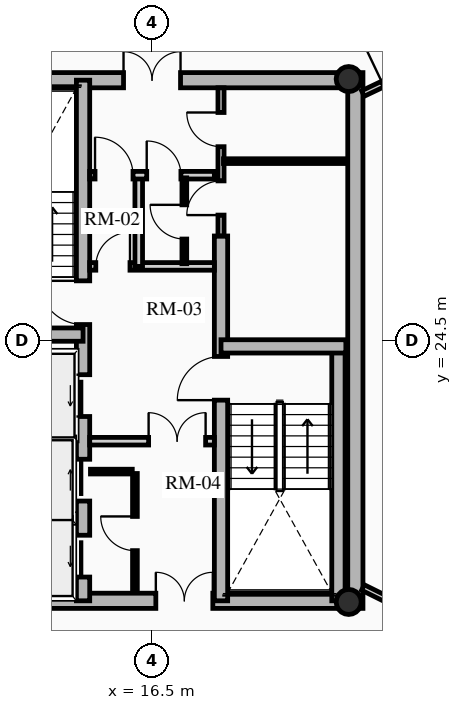
"""IFC4 building model, lengths in metres.
Left out: names, types, materials, properties, quantities, classifications, styles, units other than length and angle.
Written with IfcOpenShell. Run it as: python <this file> out.ifc"""

import sys

from ifc_helpers import new_model, si_unit, direction, frame, frame_2d, origin, origin_2d, place, context, subcontext, project, spatial, rectangle, hollow_circle, extrude, source, transform, mapped, element, fill, save


model = new_model("IFC4")
c1 = context("Model", 3, precision=1e-05, world=origin(), true_north=direction((0.0, 1.0)))
c2 = subcontext(c1, "Body", "Model", "MODEL_VIEW")
j1 = project(units=[si_unit("LENGTHUNIT", "METRE"), si_unit("PLANEANGLEUNIT", "RADIAN")], contexts=[c1])
p1 = place(None, origin())
s1 = spatial("IfcSite", under=j1, at=p1, CompositionType="ELEMENT")
p2 = place(p1, origin())
s2 = spatial("IfcBuilding", under=s1, at=p2, CompositionType="ELEMENT")
p3 = place(p2, frame((0.0, 0.0, 219.94)))
s3 = spatial("IfcBuildingStorey", under=s2, at=p3, CompositionType="ELEMENT", Elevation=219.94)
p4 = place(p3, frame((21.85, 17.45, 0.0), z_axis=(0.0, 0.0, 1.0), x_axis=(0.0, 1.0, 0.0)))
e1 = element("IfcWall", 1, at=p4, inside=s3, PredefinedType="SHEAR", context=c2, shape_type="SweptSolid", body=[
    extrude(rectangle(XDim=14.1, YDim=0.4, at=frame_2d((7.05, 0.0))), origin(), (0.0, 0.0, 1.0), 2.91),
])
p5 = place(p3, frame((11.15, 17.65, 0.0), z_axis=(0.0, 0.0, 1.0), x_axis=(1.0, 0.0, 0.0)))
e2 = element("IfcWall", 2, at=p5, inside=s3, PredefinedType="SHEAR", context=c2, shape_type="SweptSolid", body=[
    extrude(rectangle(XDim=10.7, YDim=0.4, at=frame_2d((5.35, 0.0))), origin(), (0.0, 0.0, 1.0), 2.91),
])
m1 = source(origin(), c2, "Body", "SweptSolid", [
    extrude(rectangle(XDim=1.5, YDim=2.02, at=frame_2d((0.75, 1.01))), frame((0.0, 0.21, 0.0), z_axis=(0.0, -1.0, 0.0), x_axis=(1.0, 0.0, 0.0)), (0.0, 0.0, 1.0), 0.42),
])
p6 = place(p5, frame((5.45, 0.0, 0.0)))
e3 = element("IfcOpeningElement", 3, at=p6, cuts=e2, PredefinedType="OPENING", context=c2, shape_type="MappedRepresentation", body=[
    mapped(m1, transform((0.0, 0.0, 0.0), x_axis=(1.0, 0.0, 0.0), y_axis=(0.0, 1.0, 0.0), z_axis=(0.0, 0.0, 1.0), scale=1.0)),
])
p7 = place(p3, frame((11.15, 31.35, 0.0), z_axis=(0.0, 0.0, 1.0), x_axis=(1.0, 0.0, 0.0)))
e4 = element("IfcWall", 4, at=p7, inside=s3, PredefinedType="SHEAR", context=c2, shape_type="SweptSolid", body=[
    extrude(rectangle(XDim=10.7, YDim=0.4, at=frame_2d((5.35, 0.0))), origin(), (0.0, 0.0, 1.0), 2.91),
])
p8 = place(p7, frame((4.6, 0.0, 0.0)))
e5 = element("IfcOpeningElement", 5, at=p8, cuts=e4, PredefinedType="OPENING", context=c2, shape_type="MappedRepresentation", body=[
    mapped(m1, transform((0.0, 0.0, 0.0), x_axis=(1.0, 0.0, 0.0), y_axis=(0.0, 1.0, 0.0), z_axis=(0.0, 0.0, 1.0), scale=1.0)),
])
p9 = place(p3, frame((14.685, 17.65, 0.0), z_axis=(0.0, 0.0, 1.0), x_axis=(0.0, 1.0, 0.0)))
e6 = element("IfcWall", 6, at=p9, inside=s3, PredefinedType="SHEAR", context=c2, shape_type="SweptSolid", body=[
    extrude(rectangle(XDim=13.7, YDim=0.35, at=frame_2d((6.85, 0.0))), origin(), (0.0, 0.0, 1.0), 2.91),
])
m2 = source(origin(), c2, "Body", "SweptSolid", [
    extrude(rectangle(XDim=1.1, YDim=2.015, at=frame_2d((0.55, 1.007))), frame((0.0, 0.185, 0.0), z_axis=(0.0, -1.0, 0.0), x_axis=(1.0, 0.0, 0.0)), (0.0, 0.0, 1.0), 0.37),
])
p10 = place(p9, frame((4.85, 0.0, 0.0)))
e7 = element("IfcOpeningElement", 7, at=p10, cuts=e6, PredefinedType="OPENING", context=c2, shape_type="MappedRepresentation", body=[
    mapped(m2, transform((0.0, 0.0, 0.0), x_axis=(1.0, 0.0, 0.0), y_axis=(0.0, 1.0, 0.0), z_axis=(0.0, 0.0, 1.0), scale=1.0)),
])
p11 = place(p9, frame((0.625, 0.0, 0.0)))
e8 = element("IfcOpeningElement", 8, at=p11, cuts=e6, PredefinedType="OPENING", context=c2, shape_type="MappedRepresentation", body=[
    mapped(m2, transform((0.0, 0.0, 0.0), x_axis=(1.0, 0.0, 0.0), y_axis=(0.0, 1.0, 0.0), z_axis=(0.0, 0.0, 1.0), scale=1.0)),
])
p12 = place(p9, frame((2.625, 0.0, 0.0)))
e9 = element("IfcOpeningElement", 9, at=p12, cuts=e6, PredefinedType="OPENING", context=c2, shape_type="MappedRepresentation", body=[
    mapped(m2, transform((0.0, 0.0, 0.0), x_axis=(1.0, 0.0, 0.0), y_axis=(0.0, 1.0, 0.0), z_axis=(0.0, 0.0, 1.0), scale=1.0)),
])
m3 = source(origin(), c2, "Body", "SweptSolid", [
    extrude(rectangle(XDim=1.15, YDim=2.02, at=frame_2d((0.575, 1.01))), frame((0.0, 0.185, 0.0), z_axis=(0.0, -1.0, 0.0), x_axis=(1.0, 0.0, 0.0)), (0.0, 0.0, 1.0), 0.37),
])
p13 = place(p9, frame((7.27, 0.0, 0.0)))
e10 = element("IfcOpeningElement", 10, at=p13, cuts=e6, PredefinedType="OPENING", context=c2, shape_type="MappedRepresentation", body=[
    mapped(m3, transform((0.0, 0.0, 0.0), x_axis=(1.0, 0.0, 0.0), y_axis=(0.0, 1.0, 0.0), z_axis=(0.0, 0.0, 1.0), scale=1.0)),
])
p14 = place(p3, frame((18.315, 17.65, 0.0), z_axis=(0.0, 0.0, 1.0), x_axis=(0.0, 1.0, 0.0)))
e11 = element("IfcWall", 11, at=p14, inside=s3, PredefinedType="SHEAR", context=c2, shape_type="SweptSolid", body=[
    extrude(rectangle(XDim=9.6, YDim=0.35, at=frame_2d((4.8, 0.0))), origin(), (0.0, 0.0, 1.0), 2.91),
])
p15 = place(p14, frame((5.28, 0.0, 0.0)))
e12 = element("IfcOpeningElement", 12, at=p15, cuts=e11, PredefinedType="OPENING", context=c2, shape_type="MappedRepresentation", body=[
    mapped(m3, transform((0.0, 0.0, 0.0), x_axis=(1.0, 0.0, 0.0), y_axis=(0.0, 1.0, 0.0), z_axis=(0.0, 0.0, 1.0), scale=1.0)),
])
p16 = place(p3, frame((11.4, 24.655, 0.0), z_axis=(0.0, 0.0, 1.0), x_axis=(1.0, 0.0, 0.0)))
e13 = element("IfcWall", 13, at=p16, inside=s3, PredefinedType="SHEAR", context=c2, shape_type="SweptSolid", body=[
    extrude(rectangle(XDim=3.285, YDim=0.35, at=frame_2d((1.643, 0.0))), origin(), (0.0, 0.0, 1.0), 2.91),
])
p17 = place(p3, frame((21.405, 17.65, 0.0), z_axis=(0.0, 0.0, 1.0), x_axis=(0.0, 1.0, 0.0)))
e14 = element("IfcWall", 14, at=p17, inside=s3, PredefinedType="SHEAR", context=c2, shape_type="SweptSolid", body=[
    extrude(rectangle(XDim=6.695, YDim=0.35, at=frame_2d((3.348, 0.0))), origin(), (0.0, 0.0, 1.0), 2.91),
])
p18 = place(p3, frame((18.315, 24.345, 0.0), z_axis=(0.0, 0.0, 1.0), x_axis=(1.0, 0.0, 0.0)))
e15 = element("IfcWall", 15, at=p18, inside=s3, PredefinedType="SHEAR", context=c2, shape_type="SweptSolid", body=[
    extrude(rectangle(XDim=3.285, YDim=0.35, at=frame_2d((1.643, 0.0))), origin(), (0.0, 0.0, 1.0), 2.91),
])
for number, where, z_axis, x_axis in (
    (16, (21.675, 17.62, 0.0), (0.0, 0.0, 1.0), (1.0, 0.0, 0.0)),
    (17, (21.675, 31.38, 0.0), (0.0, 0.0, 1.0), (1.0, 0.0, 0.0)),
):
    element("IfcColumn", number, at=place(p3, frame(where, z_axis=z_axis, x_axis=x_axis)), inside=s3, PredefinedType="COLUMN", context=c2, shape_type="SweptSolid", body=[
        extrude(hollow_circle(Radius=0.33, WallThickness=0.025, at=origin_2d()), origin(), (0.0, 0.0, 1.0), 2.91),
    ])
for number, where, z_axis, x_axis in (
    (18, (11.52, 21.8, 0.0), (0.0, 0.0, 1.0), (1.0, 0.0, 0.0)),
    (19, (11.52, 19.825, 0.0), (0.0, 0.0, 1.0), (1.0, 0.0, 0.0)),
):
    element("IfcWall", number, at=place(p3, frame(where, z_axis=z_axis, x_axis=x_axis)), inside=s3, PredefinedType="SHEAR", context=c2, shape_type="SweptSolid", body=[
        extrude(rectangle(XDim=2.97, YDim=0.2, at=frame_2d((1.485, 0.0))), origin(), (0.0, 0.0, 1.0), 2.91),
    ])
p19 = place(p3, frame((14.86, 21.85, 0.0), z_axis=(0.0, 0.0, 1.0), x_axis=(1.0, 0.0, 0.0)))
e20 = element("IfcWall", 20, at=p19, inside=s3, PredefinedType="PARTITIONING", context=c2, shape_type="SweptSolid", body=[
    extrude(rectangle(XDim=3.28, YDim=0.2, at=frame_2d((1.64, 0.0))), origin(), (0.0, 0.0, 1.0), 2.685),
])
m4 = source(origin(), c2, "Body", "SweptSolid", [
    extrude(rectangle(XDim=1.5, YDim=2.02, at=frame_2d((0.75, 1.01))), frame((0.0, 0.11, 0.0), z_axis=(0.0, -1.0, 0.0), x_axis=(1.0, 0.0, 0.0)), (0.0, 0.0, 1.0), 0.22),
])
p20 = place(p19, frame((1.55, 0.0, 0.0)))
e21 = element("IfcOpeningElement", 21, at=p20, cuts=e20, PredefinedType="OPENING", context=c2, shape_type="MappedRepresentation", body=[
    mapped(m4, transform((0.0, 0.0, 0.0), x_axis=(1.0, 0.0, 0.0), y_axis=(0.0, 1.0, 0.0), z_axis=(0.0, 0.0, 1.0), scale=1.0)),
])
p21 = place(p3, frame((14.86, 26.45, 0.0), z_axis=(0.0, 0.0, 1.0), x_axis=(1.0, 0.0, 0.0)))
e22 = element("IfcWall", 22, at=p21, inside=s3, PredefinedType="PARTITIONING", context=c2, shape_type="SweptSolid", body=[
    extrude(rectangle(XDim=3.28, YDim=0.2, at=frame_2d((1.64, 0.0))), origin(), (0.0, 0.0, 1.0), 2.685),
])
m5 = source(origin(), c2, "Body", "SweptSolid", [
    extrude(rectangle(XDim=0.9, YDim=2.005, at=frame_2d((0.45, 1.002))), frame((0.0, 0.11, 0.0), z_axis=(0.0, -1.0, 0.0), x_axis=(1.0, 0.0, 0.0)), (0.0, 0.0, 1.0), 0.22),
])
p22 = place(p21, frame((0.16, 0.0, 0.0)))
e23 = element("IfcOpeningElement", 23, at=p22, cuts=e22, PredefinedType="OPENING", context=c2, shape_type="MappedRepresentation", body=[
    mapped(m5, transform((0.0, 0.0, 0.0), x_axis=(1.0, 0.0, 0.0), y_axis=(0.0, 1.0, 0.0), z_axis=(0.0, 0.0, 1.0), scale=1.0)),
])
p23 = place(p3, frame((16.15, 26.45, 0.0), z_axis=(0.0, 0.0, 1.0), x_axis=(0.0, 1.0, 0.0)))
e24 = element("IfcWall", 24, at=p23, inside=s3, PredefinedType="PARTITIONING", context=c2, shape_type="SweptSolid", body=[
    extrude(rectangle(XDim=2.4, YDim=0.2, at=frame_2d((1.2, 0.0))), origin(), (0.0, 0.0, 1.0), 2.685),
])
p24 = place(p3, frame((14.86, 28.85, 0.0), z_axis=(0.0, 0.0, 1.0), x_axis=(1.0, 0.0, 0.0)))
e25 = element("IfcWall", 25, at=p24, inside=s3, PredefinedType="PARTITIONING", context=c2, shape_type="SweptSolid", body=[
    extrude(rectangle(XDim=3.28, YDim=0.2, at=frame_2d((1.64, 0.0))), origin(), (0.0, 0.0, 1.0), 2.685),
])
m6 = source(origin(), c2, "Body", "SweptSolid", [
    extrude(rectangle(XDim=1.0, YDim=2.015, at=frame_2d((0.5, 1.007))), frame((0.0, 0.11, 0.0), z_axis=(0.0, -1.0, 0.0), x_axis=(1.0, 0.0, 0.0)), (0.0, 0.0, 1.0), 0.22),
])
p25 = place(p24, frame((0.14, 0.0, 0.0)))
e26 = element("IfcOpeningElement", 26, at=p25, cuts=e25, PredefinedType="OPENING", context=c2, shape_type="MappedRepresentation", body=[
    mapped(m6, transform((0.0, 0.0, 0.0), x_axis=(1.0, 0.0, 0.0), y_axis=(0.0, 1.0, 0.0), z_axis=(0.0, 0.0, 1.0), scale=1.0)),
])
p26 = place(p24, frame((1.5, 0.0, 0.0)))
e27 = element("IfcOpeningElement", 27, at=p26, cuts=e25, PredefinedType="OPENING", context=c2, shape_type="MappedRepresentation", body=[
    mapped(m5, transform((0.0, 0.0, 0.0), x_axis=(1.0, 0.0, 0.0), y_axis=(0.0, 1.0, 0.0), z_axis=(0.0, 0.0, 1.0), scale=1.0)),
])
p27 = place(p3, frame((16.05, 17.92, 0.0), z_axis=(0.0, 0.0, 1.0), x_axis=(0.0, 1.0, 0.0)))
e28 = element("IfcWall", 28, at=p27, inside=s3, PredefinedType="PARTITIONING", context=c2, shape_type="SweptSolid", body=[
    extrude(rectangle(XDim=3.08, YDim=0.125, at=frame_2d((1.54, 0.0))), origin(), (0.0, 0.0, 1.0), 2.685),
])
m7 = source(origin(), c2, "Body", "SweptSolid", [
    extrude(rectangle(XDim=0.9, YDim=2.005, at=frame_2d((0.45, 1.002))), frame((0.0, 0.073, 0.0), z_axis=(0.0, -1.0, 0.0), x_axis=(1.0, 0.0, 0.0)), (0.0, 0.0, 1.0), 0.145),
])
p28 = place(p27, frame((1.05, 0.0, 0.0)))
e29 = element("IfcOpeningElement", 29, at=p28, cuts=e28, PredefinedType="OPENING", context=c2, shape_type="MappedRepresentation", body=[
    mapped(m7, transform((0.0, 0.0, 0.0), x_axis=(1.0, 0.0, 0.0), y_axis=(0.0, 1.0, 0.0), z_axis=(0.0, 0.0, 1.0), scale=1.0)),
])
p29 = place(p3, frame((14.88, 21.05, 0.0), z_axis=(0.0, 0.0, 1.0), x_axis=(1.0, 0.0, 0.0)))
e30 = element("IfcWall", 30, at=p29, inside=s3, PredefinedType="PARTITIONING", context=c2, shape_type="SweptSolid", body=[
    extrude(rectangle(XDim=1.1, YDim=0.125, at=frame_2d((0.55, 0.0))), origin(), (0.0, 0.0, 1.0), 2.685),
])
p30 = place(p3, frame((17.35, 26.52, 0.0), z_axis=(0.0, 0.0, 1.0), x_axis=(0.0, 1.0, 0.0)))
e31 = element("IfcWall", 31, at=p30, inside=s3, PredefinedType="PARTITIONING", context=c2, shape_type="SweptSolid", body=[
    extrude(rectangle(XDim=2.26, YDim=0.125, at=frame_2d((1.13, 0.0))), origin(), (0.0, 0.0, 1.0), 2.685),
])
p31 = place(p30, frame((0.65, 0.0, 0.0)))
e32 = element("IfcOpeningElement", 32, at=p31, cuts=e31, PredefinedType="OPENING", context=c2, shape_type="MappedRepresentation", body=[
    mapped(m7, transform((0.0, 0.0, 0.0), x_axis=(1.0, 0.0, 0.0), y_axis=(0.0, 1.0, 0.0), z_axis=(0.0, 0.0, 1.0), scale=1.0)),
])
p32 = place(p3, frame((18.315, 27.25, 0.0), z_axis=(0.0, 0.0, 1.0), x_axis=(0.0, 1.0, 0.0)))
e33 = element("IfcWall", 33, at=p32, inside=s3, PredefinedType="PARTITIONING", context=c2, shape_type="SweptSolid", body=[
    extrude(rectangle(XDim=3.9, YDim=0.16, at=frame_2d((1.95, 0.0))), origin(), (0.0, 0.0, 1.0), 2.685),
])
m8 = source(origin(), c2, "Body", "SweptSolid", [
    extrude(rectangle(XDim=0.9, YDim=2.005, at=frame_2d((0.45, 1.002))), frame((0.0, 0.09, 0.0), z_axis=(0.0, -1.0, 0.0), x_axis=(1.0, 0.0, 0.0)), (0.0, 0.0, 1.0), 0.18),
])
p33 = place(p32, frame((0.55, 0.0, 0.0)))
e34 = element("IfcOpeningElement", 34, at=p33, cuts=e33, PredefinedType="OPENING", context=c2, shape_type="MappedRepresentation", body=[
    mapped(m8, transform((0.0, 0.0, 0.0), x_axis=(1.0, 0.0, 0.0), y_axis=(0.0, 1.0, 0.0), z_axis=(0.0, 0.0, 1.0), scale=1.0)),
])
p34 = place(p32, frame((2.35, 0.0, 0.0)))
e35 = element("IfcOpeningElement", 35, at=p34, cuts=e33, PredefinedType="OPENING", context=c2, shape_type="MappedRepresentation", body=[
    mapped(m8, transform((0.0, 0.0, 0.0), x_axis=(1.0, 0.0, 0.0), y_axis=(0.0, 1.0, 0.0), z_axis=(0.0, 0.0, 1.0), scale=1.0)),
])
p35 = place(p3, frame((18.38, 29.22, 0.0), z_axis=(0.0, 0.0, 1.0), x_axis=(1.0, 0.0, 0.0)))
e36 = element("IfcWall", 36, at=p35, inside=s3, PredefinedType="PARTITIONING", context=c2, shape_type="SweptSolid", body=[
    extrude(rectangle(XDim=3.22, YDim=0.125, at=frame_2d((1.61, 0.0))), origin(), (0.0, 0.0, 1.0), 2.222),
])
p36 = place(p3, frame((22.05, 31.0, 0.0), z_axis=(0.0, 0.0, 1.0), x_axis=(0.903013459407, 0.429612257891, 0.0)))
e37 = element("IfcWall", 37, at=p36, inside=s3, PredefinedType="PARTITIONING", context=c2, shape_type="SweptSolid", body=[
    extrude(rectangle(XDim=1.829, YDim=0.16, at=frame_2d((0.914, 0.0))), origin(), (0.0, 0.0, 1.0), 2.255),
])
m9 = source(origin(), c2, "Body", "SweptSolid", [
    extrude(rectangle(XDim=1.05, YDim=2.015, at=frame_2d((0.525, 1.007))), frame((0.0, 0.09, 0.0), z_axis=(0.0, -1.0, 0.0), x_axis=(1.0, 0.0, 0.0)), (0.0, 0.0, 1.0), 0.18),
])
p37 = place(p36, frame((0.579, 0.0, 0.0)))
e38 = element("IfcOpeningElement", 38, at=p37, cuts=e37, PredefinedType="OPENING", context=c2, shape_type="MappedRepresentation", body=[
    mapped(m9, transform((0.0, 0.0, 0.0), x_axis=(1.0, 0.0, 0.0), y_axis=(0.0, 1.0, 0.0), z_axis=(0.0, 0.0, 1.0), scale=1.0)),
])
p38 = place(p3, frame((22.05, 18.0, 0.0), z_axis=(0.0, 0.0, 1.0), x_axis=(0.896045848613, -0.443961526692, 0.0)))
e39 = element("IfcWall", 39, at=p38, inside=s3, PredefinedType="PARTITIONING", context=c2, shape_type="SweptSolid", body=[
    extrude(rectangle(XDim=1.924, YDim=0.16, at=frame_2d((0.962, 0.0))), origin(), (0.0, 0.0, 1.0), 2.255),
])
p39 = place(p38, frame((0.674, 0.0, 0.0)))
e40 = element("IfcOpeningElement", 40, at=p39, cuts=e39, PredefinedType="OPENING", context=c2, shape_type="MappedRepresentation", body=[
    mapped(m9, transform((0.0, 0.0, 0.0), x_axis=(1.0, 0.0, 0.0), y_axis=(0.0, 1.0, 0.0), z_axis=(0.0, 0.0, 1.0), scale=1.0)),
])
m10 = source(origin(), c2, "Body", "SweptSolid", [
    extrude(rectangle(XDim=1.1, YDim=2.015, at=frame_2d((0.55, 1.007))), frame((0.0, 0.025, 0.0), z_axis=(0.0, -1.0, 0.0), x_axis=(1.0, 0.0, 0.0)), (0.0, 0.0, 1.0), 0.05),
])
p40 = place(p10, origin())
e41 = element("IfcDoor", 41, at=p40, inside=s3, OperationType="SLIDING_TO_LEFT", PredefinedType="DOOR", context=c2, shape_type="MappedRepresentation", body=[
    mapped(m10, transform((0.0, 0.0, 0.0), x_axis=(1.0, 0.0, 0.0), y_axis=(0.0, 1.0, 0.0), z_axis=(0.0, 0.0, 1.0), scale=1.0)),
])
fill(e7, e41)
p41 = place(p11, origin())
e42 = element("IfcDoor", 42, at=p41, inside=s3, OperationType="SLIDING_TO_LEFT", PredefinedType="DOOR", context=c2, shape_type="MappedRepresentation", body=[
    mapped(m10, transform((0.0, 0.0, 0.0), x_axis=(1.0, 0.0, 0.0), y_axis=(0.0, 1.0, 0.0), z_axis=(0.0, 0.0, 1.0), scale=1.0)),
])
fill(e8, e42)
p42 = place(p12, origin())
e43 = element("IfcDoor", 43, at=p42, inside=s3, OperationType="SLIDING_TO_RIGHT", PredefinedType="DOOR", context=c2, shape_type="MappedRepresentation", body=[
    mapped(m10, transform((0.0, 0.0, 0.0), x_axis=(1.0, 0.0, 0.0), y_axis=(0.0, 1.0, 0.0), z_axis=(0.0, 0.0, 1.0), scale=1.0)),
])
fill(e9, e43)
m11 = source(origin(), c2, "Body", "SweptSolid", [
    extrude(rectangle(XDim=1.15, YDim=2.02, at=frame_2d((0.575, 1.01))), frame((0.0, 0.025, 0.0), z_axis=(0.0, -1.0, 0.0), x_axis=(1.0, 0.0, 0.0)), (0.0, 0.0, 1.0), 0.05),
])
p43 = place(p13, origin())
e44 = element("IfcDoor", 44, at=p43, inside=s3, OperationType="SINGLE_SWING_RIGHT", PredefinedType="DOOR", context=c2, shape_type="MappedRepresentation", body=[
    mapped(m11, transform((0.0, 0.0, 0.0), x_axis=(1.0, 0.0, 0.0), y_axis=(0.0, 1.0, 0.0), z_axis=(0.0, 0.0, 1.0), scale=1.0)),
])
fill(e10, e44)
p44 = place(p15, origin())
e45 = element("IfcDoor", 45, at=p44, inside=s3, OperationType="SINGLE_SWING_LEFT", PredefinedType="DOOR", context=c2, shape_type="MappedRepresentation", body=[
    mapped(m11, transform((0.0, 0.0, 0.0), x_axis=(1.0, 0.0, 0.0), y_axis=(0.0, 1.0, 0.0), z_axis=(0.0, 0.0, 1.0), scale=1.0)),
])
fill(e12, e45)
m12 = source(origin(), c2, "Body", "SweptSolid", [
    extrude(rectangle(XDim=1.5, YDim=2.02, at=frame_2d((0.75, 1.01))), frame((0.0, 0.025, 0.0), z_axis=(0.0, -1.0, 0.0), x_axis=(1.0, 0.0, 0.0)), (0.0, 0.0, 1.0), 0.05),
])
p45 = place(p8, origin())
e46 = element("IfcDoor", 46, at=p45, inside=s3, OperationType="DOUBLE_DOOR_SINGLE_SWING", PredefinedType="DOOR", context=c2, shape_type="MappedRepresentation", body=[
    mapped(m12, transform((0.0, 0.0, 0.0), x_axis=(1.0, 0.0, 0.0), y_axis=(0.0, 1.0, 0.0), z_axis=(0.0, 0.0, 1.0), scale=1.0)),
])
fill(e5, e46)
p46 = place(p6, origin())
e47 = element("IfcDoor", 47, at=p46, inside=s3, OperationType="DOUBLE_DOOR_SINGLE_SWING", PredefinedType="DOOR", context=c2, shape_type="MappedRepresentation", body=[
    mapped(m12, transform((0.0, 0.0, 0.0), x_axis=(1.0, 0.0, 0.0), y_axis=(0.0, 1.0, 0.0), z_axis=(0.0, 0.0, 1.0), scale=1.0)),
])
fill(e3, e47)
p47 = place(p20, origin())
e48 = element("IfcDoor", 48, at=p47, inside=s3, OperationType="DOUBLE_DOOR_SINGLE_SWING", PredefinedType="DOOR", context=c2, shape_type="MappedRepresentation", body=[
    mapped(m12, transform((0.0, 0.0, 0.0), x_axis=(1.0, 0.0, 0.0), y_axis=(0.0, 1.0, 0.0), z_axis=(0.0, 0.0, 1.0), scale=1.0)),
])
fill(e21, e48)
m13 = source(origin(), c2, "Body", "SweptSolid", [
    extrude(rectangle(XDim=0.9, YDim=2.005, at=frame_2d((0.45, 1.002))), frame((0.0, 0.025, 0.0), z_axis=(0.0, -1.0, 0.0), x_axis=(1.0, 0.0, 0.0)), (0.0, 0.0, 1.0), 0.05),
])
p48 = place(p22, origin())
e49 = element("IfcDoor", 49, at=p48, inside=s3, OperationType="SINGLE_SWING_RIGHT", PredefinedType="DOOR", context=c2, shape_type="MappedRepresentation", body=[
    mapped(m13, transform((0.0, 0.0, 0.0), x_axis=(1.0, 0.0, 0.0), y_axis=(0.0, 1.0, 0.0), z_axis=(0.0, 0.0, 1.0), scale=1.0)),
])
fill(e23, e49)
m14 = source(origin(), c2, "Body", "SweptSolid", [
    extrude(rectangle(XDim=1.0, YDim=2.015, at=frame_2d((0.5, 1.007))), frame((0.0, 0.025, 0.0), z_axis=(0.0, -1.0, 0.0), x_axis=(1.0, 0.0, 0.0)), (0.0, 0.0, 1.0), 0.05),
])
p49 = place(p25, origin())
e50 = element("IfcDoor", 50, at=p49, inside=s3, OperationType="SINGLE_SWING_LEFT", PredefinedType="DOOR", context=c2, shape_type="MappedRepresentation", body=[
    mapped(m14, transform((0.0, 0.0, 0.0), x_axis=(1.0, 0.0, 0.0), y_axis=(0.0, 1.0, 0.0), z_axis=(0.0, 0.0, 1.0), scale=1.0)),
])
fill(e26, e50)
p50 = place(p28, origin())
e51 = element("IfcDoor", 51, at=p50, inside=s3, OperationType="SINGLE_SWING_RIGHT", PredefinedType="DOOR", context=c2, shape_type="MappedRepresentation", body=[
    mapped(m13, transform((0.0, 0.0, 0.0), x_axis=(1.0, 0.0, 0.0), y_axis=(0.0, 1.0, 0.0), z_axis=(0.0, 0.0, 1.0), scale=1.0)),
])
fill(e29, e51)
p51 = place(p26, origin())
e52 = element("IfcDoor", 52, at=p51, inside=s3, OperationType="SINGLE_SWING_LEFT", PredefinedType="DOOR", context=c2, shape_type="MappedRepresentation", body=[
    mapped(m13, transform((0.0, 0.0, 0.0), x_axis=(1.0, 0.0, 0.0), y_axis=(0.0, 1.0, 0.0), z_axis=(0.0, 0.0, 1.0), scale=1.0)),
])
fill(e27, e52)
p52 = place(p31, origin())
e53 = element("IfcDoor", 53, at=p52, inside=s3, OperationType="SINGLE_SWING_RIGHT", PredefinedType="DOOR", context=c2, shape_type="MappedRepresentation", body=[
    mapped(m13, transform((0.0, 0.0, 0.0), x_axis=(1.0, 0.0, 0.0), y_axis=(0.0, 1.0, 0.0), z_axis=(0.0, 0.0, 1.0), scale=1.0)),
])
fill(e32, e53)
p53 = place(p33, origin())
e54 = element("IfcDoor", 54, at=p53, inside=s3, OperationType="SINGLE_SWING_LEFT", PredefinedType="DOOR", context=c2, shape_type="MappedRepresentation", body=[
    mapped(m13, transform((0.0, 0.0, 0.0), x_axis=(1.0, 0.0, 0.0), y_axis=(0.0, 1.0, 0.0), z_axis=(0.0, 0.0, 1.0), scale=1.0)),
])
fill(e34, e54)
p54 = place(p34, origin())
e55 = element("IfcDoor", 55, at=p54, inside=s3, OperationType="SINGLE_SWING_RIGHT", PredefinedType="DOOR", context=c2, shape_type="MappedRepresentation", body=[
    mapped(m13, transform((0.0, 0.0, 0.0), x_axis=(1.0, 0.0, 0.0), y_axis=(0.0, 1.0, 0.0), z_axis=(0.0, 0.0, 1.0), scale=1.0)),
])
fill(e35, e55)
save(model, sys.argv[1])
